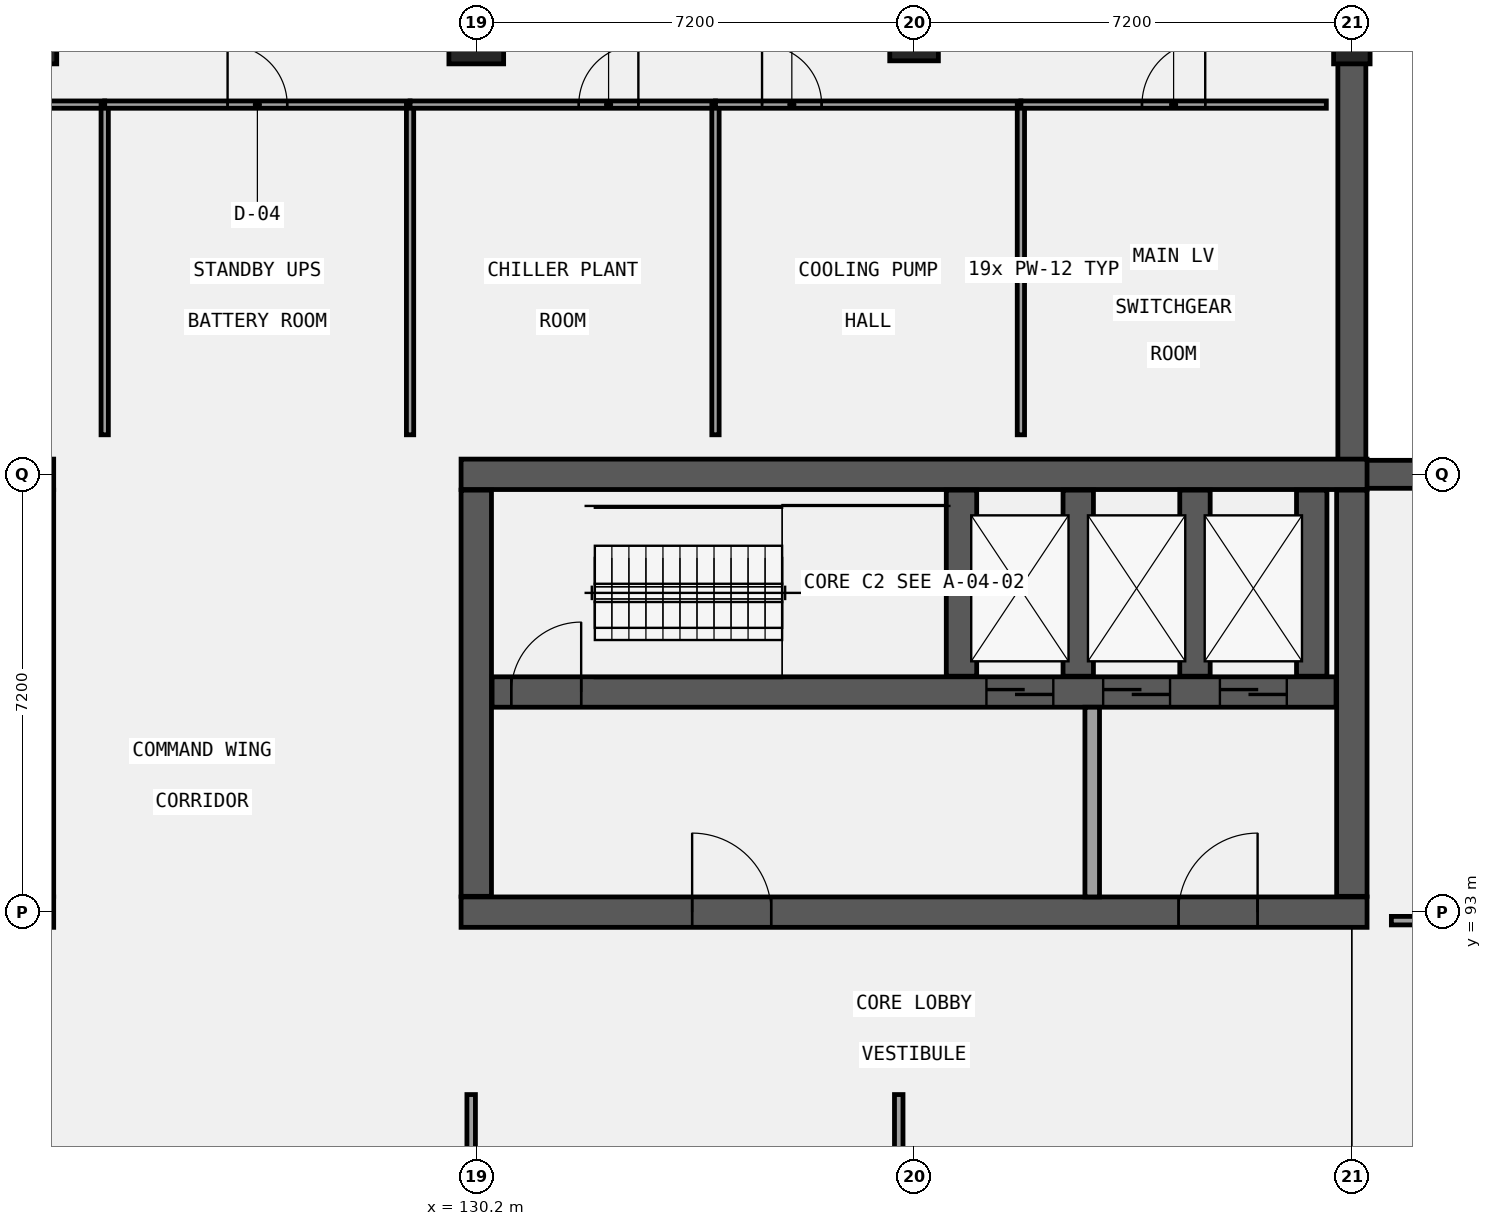
"""IFC4 building model, lengths in metres.
Left out: names, types, materials, properties, quantities, classifications, styles, units other than length and angle.
Written with IfcOpenShell. Run it as: python <this file> out.ifc"""

import sys

from ifc_helpers import new_model, si_unit, direction, frame, frame_2d, origin, origin_2d, place, context, subcontext, project, spatial, rectangle, extrude, element, fill, save


model = new_model("IFC4")
c1 = context("Model", 3, precision=1e-05, world=origin(), true_north=direction((0.0, 1.0)))
c2 = subcontext(c1, "Body", "Model", "MODEL_VIEW")
j1 = project(units=[si_unit("LENGTHUNIT", "METRE"), si_unit("PLANEANGLEUNIT", "RADIAN")], contexts=[c1])
p1 = place(None, origin())
s1 = spatial("IfcSite", under=j1, at=p1, CompositionType="ELEMENT")
p2 = place(p1, origin())
s2 = spatial("IfcBuilding", under=s1, at=p2, CompositionType="ELEMENT")
p3 = place(p2, frame((0.0, 0.0, -8.4)))
s3 = spatial("IfcBuildingStorey", under=s2, at=p3, CompositionType="ELEMENT", Elevation=-8.4)
p4 = place(p3, frame((144.6, 113.78, 0.0), z_axis=(0.0, 0.0, 1.0), x_axis=(0.0, -1.0, 0.0)))
e1 = element("IfcWall", 1, at=p4, inside=s3, PredefinedType="USERDEFINED", context=c2, shape_type="SweptSolid", body=[
    extrude(rectangle(XDim=13.35, YDim=0.46, at=frame_2d((6.675, 0.0))), origin(), (0.0, 0.0, 1.0), 3.25),
])
p5 = place(p3, frame((144.83, 100.2, 0.0), z_axis=(0.0, 0.0, 1.0), x_axis=(1.0, 0.0, 0.0)))
e2 = element("IfcWall", 2, at=p5, inside=s3, PredefinedType="USERDEFINED", context=c2, shape_type="SweptSolid", body=[
    extrude(rectangle(XDim=14.4, YDim=0.46, at=frame_2d((7.2, 0.0))), origin(), (0.0, 0.0, 1.0), 2.9),
])
p6 = place(p3, frame((108.35, 100.2, 0.0), z_axis=(0.0, 0.0, 1.0), x_axis=(1.0, 0.0, 0.0)))
e3 = element("IfcWall", 3, at=p6, inside=s3, PredefinedType="SHEAR", context=c2, shape_type="SweptSolid", body=[
    extrude(rectangle(XDim=14.9, YDim=0.5, at=frame_2d((7.45, 0.0))), origin(), (0.0, 0.0, 1.0), 4.2),
])
p7 = place(p3, frame((108.35, 93.0, 0.0), z_axis=(0.0, 0.0, 1.0), x_axis=(1.0, 0.0, 0.0)))
e4 = element("IfcWall", 4, at=p7, inside=s3, PredefinedType="SHEAR", context=c2, shape_type="SweptSolid", body=[
    extrude(rectangle(XDim=14.9, YDim=0.5, at=frame_2d((7.45, 0.0))), origin(), (0.0, 0.0, 1.0), 4.2),
])
p8 = place(p7, frame((3.8, 0.0, 0.0)))
e5 = element("IfcOpeningElement", 5, at=p8, cuts=e4, PredefinedType="OPENING", context=c2, shape_type="SweptSolid", body=[
    extrude(rectangle(XDim=1.3, YDim=2.2, at=frame_2d((0.65, 1.1))), frame((0.0, 0.26, 0.0), z_axis=(0.0, -1.0, 0.0), x_axis=(1.0, 0.0, 0.0)), (0.0, 0.0, 1.0), 0.52),
])
p9 = place(p7, frame((11.8, 0.0, 0.0)))
e6 = element("IfcOpeningElement", 6, at=p9, cuts=e4, PredefinedType="OPENING", context=c2, shape_type="SweptSolid", body=[
    extrude(rectangle(XDim=1.3, YDim=2.2, at=frame_2d((0.65, 1.1))), frame((0.0, 0.26, 0.0), z_axis=(0.0, -1.0, 0.0), x_axis=(1.0, 0.0, 0.0)), (0.0, 0.0, 1.0), 0.52),
])
p10 = place(p3, frame((123.0, 93.26, 0.0), z_axis=(0.0, 0.0, 1.0), x_axis=(0.0, 1.0, 0.0)))
e7 = element("IfcWall", 7, at=p10, inside=s3, PredefinedType="SHEAR", context=c2, shape_type="SweptSolid", body=[
    extrude(rectangle(XDim=6.68, YDim=0.5, at=frame_2d((3.34, 0.0))), origin(), (0.0, 0.0, 1.0), 4.2),
])
p11 = place(p3, frame((129.95, 100.2, 0.0), z_axis=(0.0, 0.0, 1.0), x_axis=(1.0, 0.0, 0.0)))
e8 = element("IfcWall", 8, at=p11, inside=s3, PredefinedType="SHEAR", context=c2, shape_type="SweptSolid", body=[
    extrude(rectangle(XDim=14.9, YDim=0.5, at=frame_2d((7.45, 0.0))), origin(), (0.0, 0.0, 1.0), 4.2),
])
p12 = place(p3, frame((129.95, 93.0, 0.0), z_axis=(0.0, 0.0, 1.0), x_axis=(1.0, 0.0, 0.0)))
e9 = element("IfcWall", 9, at=p12, inside=s3, PredefinedType="SHEAR", context=c2, shape_type="SweptSolid", body=[
    extrude(rectangle(XDim=14.9, YDim=0.5, at=frame_2d((7.45, 0.0))), origin(), (0.0, 0.0, 1.0), 4.2),
])
p13 = place(p12, frame((3.8, 0.0, 0.0)))
e10 = element("IfcOpeningElement", 10, at=p13, cuts=e9, PredefinedType="OPENING", context=c2, shape_type="SweptSolid", body=[
    extrude(rectangle(XDim=1.3, YDim=2.2, at=frame_2d((0.65, 1.1))), frame((0.0, 0.26, 0.0), z_axis=(0.0, -1.0, 0.0), x_axis=(1.0, 0.0, 0.0)), (0.0, 0.0, 1.0), 0.52),
])
p14 = place(p12, frame((11.8, 0.0, 0.0)))
e11 = element("IfcOpeningElement", 11, at=p14, cuts=e9, PredefinedType="OPENING", context=c2, shape_type="SweptSolid", body=[
    extrude(rectangle(XDim=1.3, YDim=2.2, at=frame_2d((0.65, 1.1))), frame((0.0, 0.26, 0.0), z_axis=(0.0, -1.0, 0.0), x_axis=(1.0, 0.0, 0.0)), (0.0, 0.0, 1.0), 0.52),
])
for number, where, z_axis, x_axis in (
    (12, (130.2, 93.26, 0.0), (0.0, 0.0, 1.0), (0.0, 1.0, 0.0)),
    (13, (144.6, 93.26, 0.0), (0.0, 0.0, 1.0), (0.0, 1.0, 0.0)),
):
    element("IfcWall", number, at=place(p3, frame(where, z_axis=z_axis, x_axis=x_axis)), inside=s3, PredefinedType="SHEAR", context=c2, shape_type="SweptSolid", body=[
        extrude(rectangle(XDim=6.68, YDim=0.5, at=frame_2d((3.34, 0.0))), origin(), (0.0, 0.0, 1.0), 4.2),
    ])
p15 = place(p3, frame((130.46, 96.62, 0.0), z_axis=(0.0, 0.0, 1.0), x_axis=(1.0, 0.0, 0.0)))
e14 = element("IfcWall", 14, at=p15, inside=s3, PredefinedType="SHEAR", context=c2, shape_type="SweptSolid", body=[
    extrude(rectangle(XDim=13.88, YDim=0.5, at=frame_2d((6.94, 0.0))), origin(), (0.0, 0.0, 1.0), 4.2),
])
p16 = place(p15, frame((8.13, 0.0, 0.0)))
e15 = element("IfcOpeningElement", 15, at=p16, cuts=e14, PredefinedType="OPENING", context=c2, shape_type="SweptSolid", body=[
    extrude(rectangle(XDim=1.1, YDim=2.15, at=frame_2d((0.55, 1.075))), frame((0.0, 0.26, 0.0), z_axis=(0.0, -1.0, 0.0), x_axis=(1.0, 0.0, 0.0)), (0.0, 0.0, 1.0), 0.52),
])
p17 = place(p15, frame((10.05, 0.0, 0.0)))
e16 = element("IfcOpeningElement", 16, at=p17, cuts=e14, PredefinedType="OPENING", context=c2, shape_type="SweptSolid", body=[
    extrude(rectangle(XDim=1.1, YDim=2.15, at=frame_2d((0.55, 1.075))), frame((0.0, 0.26, 0.0), z_axis=(0.0, -1.0, 0.0), x_axis=(1.0, 0.0, 0.0)), (0.0, 0.0, 1.0), 0.52),
])
p18 = place(p15, frame((11.97, 0.0, 0.0)))
e17 = element("IfcOpeningElement", 17, at=p18, cuts=e14, PredefinedType="OPENING", context=c2, shape_type="SweptSolid", body=[
    extrude(rectangle(XDim=1.1, YDim=2.15, at=frame_2d((0.55, 1.075))), frame((0.0, 0.26, 0.0), z_axis=(0.0, -1.0, 0.0), x_axis=(1.0, 0.0, 0.0)), (0.0, 0.0, 1.0), 0.52),
])
p19 = place(p15, frame((0.315, 0.0, 0.0)))
e18 = element("IfcOpeningElement", 18, at=p19, cuts=e14, PredefinedType="OPENING", context=c2, shape_type="SweptSolid", body=[
    extrude(rectangle(XDim=1.15, YDim=2.15, at=frame_2d((0.575, 1.075))), frame((0.0, 0.26, 0.0), z_axis=(0.0, -1.0, 0.0), x_axis=(1.0, 0.0, 0.0)), (0.0, 0.0, 1.0), 0.52),
])
for number, where, z_axis, x_axis in (
    (19, (138.18, 96.88, 0.0), (0.0, 0.0, 1.0), (0.0, 1.0, 0.0)),
    (20, (140.1, 96.88, 0.0), (0.0, 0.0, 1.0), (0.0, 1.0, 0.0)),
    (21, (142.02, 96.88, 0.0), (0.0, 0.0, 1.0), (0.0, 1.0, 0.0)),
    (22, (143.94, 96.88, 0.0), (0.0, 0.0, 1.0), (0.0, 1.0, 0.0)),
):
    element("IfcWall", number, at=place(p3, frame(where, z_axis=z_axis, x_axis=x_axis)), inside=s3, PredefinedType="SHEAR", context=c2, shape_type="SweptSolid", body=[
        extrude(rectangle(XDim=3.06, YDim=0.5, at=frame_2d((1.53, 0.0))), origin(), (0.0, 0.0, 1.0), 4.2),
    ])
p20 = place(p3, frame((123.0, 107.4, 0.0), z_axis=(0.0, 0.0, 1.0), x_axis=(1.0, 0.0, 0.0)))
e23 = element("IfcColumn", 23, at=p20, inside=s3, PredefinedType="COLUMN", context=c2, shape_type="SweptSolid", body=[
    extrude(rectangle(XDim=0.6, YDim=0.9, at=origin_2d()), origin(), (0.0, 0.0, 1.0), 4.2),
])
p21 = place(p3, frame((130.2, 107.4, 0.0), z_axis=(0.0, 0.0, 1.0), x_axis=(1.0, 0.0, 0.0)))
e24 = element("IfcColumn", 24, at=p21, inside=s3, PredefinedType="COLUMN", context=c2, shape_type="SweptSolid", body=[
    extrude(rectangle(XDim=0.9, YDim=0.9, at=origin_2d()), origin(), (0.0, 0.0, 1.0), 4.2),
])
p22 = place(p3, frame((137.4, 107.4, 0.0), z_axis=(0.0, 0.0, 1.0), x_axis=(1.0, 0.0, 0.0)))
e25 = element("IfcColumn", 25, at=p22, inside=s3, PredefinedType="COLUMN", context=c2, shape_type="SweptSolid", body=[
    extrude(rectangle(XDim=0.8, YDim=0.8, at=origin_2d()), origin(), (0.0, 0.0, 1.0), 4.2),
])
p23 = place(p3, frame((144.6, 107.4, 0.0), z_axis=(0.0, 0.0, 1.0), x_axis=(1.0, 0.0, 0.0)))
e26 = element("IfcColumn", 26, at=p23, inside=s3, PredefinedType="COLUMN", context=c2, shape_type="SweptSolid", body=[
    extrude(rectangle(XDim=0.6, YDim=0.9, at=origin_2d()), origin(), (0.0, 0.0, 1.0), 4.2),
])
p24 = place(p3, frame((140.33, 93.25, 0.0), z_axis=(0.0, 0.0, 1.0), x_axis=(0.0, 1.0, 0.0)))
e27 = element("IfcWall", 27, at=p24, inside=s3, PredefinedType="SOLIDWALL", context=c2, shape_type="SweptSolid", body=[
    extrude(rectangle(XDim=3.12, YDim=0.24, at=frame_2d((1.56, 0.0))), origin(), (0.0, 0.0, 1.0), 3.87),
])
p25 = place(p3, frame((119.066, 106.28, 0.0), z_axis=(0.0, 0.0, 1.0), x_axis=(1.0, 0.0, 0.0)))
e28 = element("IfcWall", 28, at=p25, inside=s3, PredefinedType="PARTITIONING", context=c2, shape_type="SweptSolid", body=[
    extrude(rectangle(XDim=5.023, YDim=0.12, at=frame_2d((2.512, 0.0))), origin(), (0.0, 0.0, 1.0), 3.9),
])
p26 = place(p25, frame((1.298, 0.0, 0.0)))
e29 = element("IfcOpeningElement", 29, at=p26, cuts=e28, PredefinedType="OPENING", context=c2, shape_type="SweptSolid", body=[
    extrude(rectangle(XDim=0.92, YDim=2.35, at=frame_2d((0.46, 1.175))), frame((0.0, 0.07, 0.0), z_axis=(0.0, -1.0, 0.0), x_axis=(1.0, 0.0, 0.0)), (0.0, 0.0, 1.0), 0.14),
])
p27 = place(p3, frame((124.089, 100.85, 0.0), z_axis=(0.0, 0.0, 1.0), x_axis=(0.0, 1.0, 0.0)))
e30 = element("IfcWall", 30, at=p27, inside=s3, PredefinedType="PARTITIONING", context=c2, shape_type="SweptSolid", body=[
    extrude(rectangle(XDim=5.43, YDim=0.12, at=frame_2d((2.715, 0.0))), origin(), (0.0, 0.0, 1.0), 3.9),
])
p28 = place(p3, frame((124.089, 106.28, 0.0), z_axis=(0.0, 0.0, 1.0), x_axis=(1.0, 0.0, 0.0)))
e31 = element("IfcWall", 31, at=p28, inside=s3, PredefinedType="PARTITIONING", context=c2, shape_type="SweptSolid", body=[
    extrude(rectangle(XDim=5.022, YDim=0.12, at=frame_2d((2.511, 0.0))), origin(), (0.0, 0.0, 1.0), 3.9),
])
p29 = place(p28, frame((2.021, 0.0, 0.0)))
e32 = element("IfcOpeningElement", 32, at=p29, cuts=e31, PredefinedType="OPENING", context=c2, shape_type="SweptSolid", body=[
    extrude(rectangle(XDim=0.98, YDim=2.1, at=frame_2d((0.49, 1.05))), frame((0.0, 0.07, 0.0), z_axis=(0.0, -1.0, 0.0), x_axis=(1.0, 0.0, 0.0)), (0.0, 0.0, 1.0), 0.14),
])
p30 = place(p3, frame((129.111, 100.85, 0.0), z_axis=(0.0, 0.0, 1.0), x_axis=(0.0, 1.0, 0.0)))
e33 = element("IfcWall", 33, at=p30, inside=s3, PredefinedType="PARTITIONING", context=c2, shape_type="SweptSolid", body=[
    extrude(rectangle(XDim=5.43, YDim=0.12, at=frame_2d((2.715, 0.0))), origin(), (0.0, 0.0, 1.0), 3.9),
])
p31 = place(p3, frame((129.111, 106.28, 0.0), z_axis=(0.0, 0.0, 1.0), x_axis=(1.0, 0.0, 0.0)))
e34 = element("IfcWall", 34, at=p31, inside=s3, PredefinedType="PARTITIONING", context=c2, shape_type="SweptSolid", body=[
    extrude(rectangle(XDim=5.023, YDim=0.12, at=frame_2d((2.511, 0.0))), origin(), (0.0, 0.0, 1.0), 3.9),
])
p32 = place(p31, frame((2.775, 0.0, 0.0)))
e35 = element("IfcOpeningElement", 35, at=p32, cuts=e34, PredefinedType="OPENING", context=c2, shape_type="SweptSolid", body=[
    extrude(rectangle(XDim=0.98, YDim=2.22, at=frame_2d((0.49, 1.11))), frame((0.0, 0.07, 0.0), z_axis=(0.0, -1.0, 0.0), x_axis=(1.0, 0.0, 0.0)), (0.0, 0.0, 1.0), 0.14),
])
p33 = place(p3, frame((134.134, 100.85, 0.0), z_axis=(0.0, 0.0, 1.0), x_axis=(0.0, 1.0, 0.0)))
e36 = element("IfcWall", 36, at=p33, inside=s3, PredefinedType="PARTITIONING", context=c2, shape_type="SweptSolid", body=[
    extrude(rectangle(XDim=5.43, YDim=0.12, at=frame_2d((2.715, 0.0))), origin(), (0.0, 0.0, 1.0), 3.9),
])
p34 = place(p3, frame((134.134, 106.28, 0.0), z_axis=(0.0, 0.0, 1.0), x_axis=(1.0, 0.0, 0.0)))
e37 = element("IfcWall", 37, at=p34, inside=s3, PredefinedType="PARTITIONING", context=c2, shape_type="SweptSolid", body=[
    extrude(rectangle(XDim=5.023, YDim=0.12, at=frame_2d((2.511, 0.0))), origin(), (0.0, 0.0, 1.0), 3.9),
])
p35 = place(p34, frame((0.766, 0.0, 0.0)))
e38 = element("IfcOpeningElement", 38, at=p35, cuts=e37, PredefinedType="OPENING", context=c2, shape_type="SweptSolid", body=[
    extrude(rectangle(XDim=0.98, YDim=2.35, at=frame_2d((0.49, 1.175))), frame((0.0, 0.07, 0.0), z_axis=(0.0, -1.0, 0.0), x_axis=(1.0, 0.0, 0.0)), (0.0, 0.0, 1.0), 0.14),
])
p36 = place(p3, frame((139.157, 100.85, 0.0), z_axis=(0.0, 0.0, 1.0), x_axis=(0.0, 1.0, 0.0)))
e39 = element("IfcWall", 39, at=p36, inside=s3, PredefinedType="PARTITIONING", context=c2, shape_type="SweptSolid", body=[
    extrude(rectangle(XDim=5.43, YDim=0.12, at=frame_2d((2.715, 0.0))), origin(), (0.0, 0.0, 1.0), 3.9),
])
p37 = place(p3, frame((139.157, 106.28, 0.0), z_axis=(0.0, 0.0, 1.0), x_axis=(1.0, 0.0, 0.0)))
e40 = element("IfcWall", 40, at=p37, inside=s3, PredefinedType="PARTITIONING", context=c2, shape_type="SweptSolid", body=[
    extrude(rectangle(XDim=5.023, YDim=0.12, at=frame_2d((2.511, 0.0))), origin(), (0.0, 0.0, 1.0), 3.9),
])
p38 = place(p37, frame((1.991, 0.0, 0.0)))
e41 = element("IfcOpeningElement", 41, at=p38, cuts=e40, PredefinedType="OPENING", context=c2, shape_type="SweptSolid", body=[
    extrude(rectangle(XDim=1.04, YDim=2.1, at=frame_2d((0.52, 1.05))), frame((0.0, 0.07, 0.0), z_axis=(0.0, -1.0, 0.0), x_axis=(1.0, 0.0, 0.0)), (0.0, 0.0, 1.0), 0.14),
])
p39 = place(p3, frame((130.116, 83.22, 0.0), z_axis=(0.0, 0.0, 1.0), x_axis=(0.0, 1.0, 0.0)))
e42 = element("IfcWall", 42, at=p39, inside=s3, PredefinedType="PARTITIONING", context=c2, shape_type="SweptSolid", body=[
    extrude(rectangle(XDim=6.78, YDim=0.14, at=frame_2d((3.39, 0.0))), origin(), (0.0, 0.0, 1.0), 3.05),
])
p40 = place(p3, frame((137.148, 83.22, 0.0), z_axis=(0.0, 0.0, 1.0), x_axis=(0.0, 1.0, 0.0)))
e43 = element("IfcWall", 43, at=p40, inside=s3, PredefinedType="PARTITIONING", context=c2, shape_type="SweptSolid", body=[
    extrude(rectangle(XDim=6.78, YDim=0.14, at=frame_2d((3.39, 0.0))), origin(), (0.0, 0.0, 1.0), 3.0),
])
p41 = place(p3, frame((145.25, 92.86, 0.0), z_axis=(0.0, 0.0, 1.0), x_axis=(1.0, 0.0, 0.0)))
e44 = element("IfcWall", 44, at=p41, inside=s3, PredefinedType="PARTITIONING", context=c2, shape_type="SweptSolid", body=[
    extrude(rectangle(XDim=6.03, YDim=0.14, at=frame_2d((3.015, 0.0))), origin(), (0.0, 0.0, 1.0), 3.05),
])
p42 = place(p16, frame((1.1, 0.0, 0.0), z_axis=(0.0, 0.0, 1.0), x_axis=(-1.0, 0.0, 0.0)))
e45 = element("IfcDoor", 45, at=p42, inside=s3, OperationType="DOUBLE_DOOR_SLIDING", PredefinedType="DOOR", context=c2, shape_type="SweptSolid", body=[
    extrude(rectangle(XDim=1.1, YDim=2.15, at=frame_2d((0.55, 1.075))), frame((0.0, 0.025, 0.0), z_axis=(0.0, -1.0, 0.0), x_axis=(1.0, 0.0, 0.0)), (0.0, 0.0, 1.0), 0.05),
])
fill(e15, e45)
p43 = place(p17, frame((1.1, 0.0, 0.0), z_axis=(0.0, 0.0, 1.0), x_axis=(-1.0, 0.0, 0.0)))
e46 = element("IfcDoor", 46, at=p43, inside=s3, OperationType="DOUBLE_DOOR_SLIDING", PredefinedType="DOOR", context=c2, shape_type="SweptSolid", body=[
    extrude(rectangle(XDim=1.1, YDim=2.15, at=frame_2d((0.55, 1.075))), frame((0.0, 0.025, 0.0), z_axis=(0.0, -1.0, 0.0), x_axis=(1.0, 0.0, 0.0)), (0.0, 0.0, 1.0), 0.05),
])
fill(e16, e46)
p44 = place(p18, frame((1.1, 0.0, 0.0), z_axis=(0.0, 0.0, 1.0), x_axis=(-1.0, 0.0, 0.0)))
e47 = element("IfcDoor", 47, at=p44, inside=s3, OperationType="DOUBLE_DOOR_SLIDING", PredefinedType="DOOR", context=c2, shape_type="SweptSolid", body=[
    extrude(rectangle(XDim=1.1, YDim=2.15, at=frame_2d((0.55, 1.075))), frame((0.0, 0.025, 0.0), z_axis=(0.0, -1.0, 0.0), x_axis=(1.0, 0.0, 0.0)), (0.0, 0.0, 1.0), 0.05),
])
fill(e17, e47)
p45 = place(p19, origin())
e48 = element("IfcDoor", 48, at=p45, inside=s3, OperationType="SINGLE_SWING_RIGHT", PredefinedType="DOOR", context=c2, shape_type="SweptSolid", body=[
    extrude(rectangle(XDim=1.15, YDim=2.15, at=frame_2d((0.575, 1.075))), frame((0.0, 0.025, 0.0), z_axis=(0.0, -1.0, 0.0), x_axis=(1.0, 0.0, 0.0)), (0.0, 0.0, 1.0), 0.05),
])
fill(e18, e48)
p46 = place(p13, frame((1.3, 0.0, 0.0), z_axis=(0.0, 0.0, 1.0), x_axis=(-1.0, 0.0, 0.0)))
e49 = element("IfcDoor", 49, at=p46, inside=s3, OperationType="SINGLE_SWING_LEFT", PredefinedType="DOOR", context=c2, shape_type="SweptSolid", body=[
    extrude(rectangle(XDim=1.3, YDim=2.2, at=frame_2d((0.65, 1.1))), frame((0.0, 0.025, 0.0), z_axis=(0.0, -1.0, 0.0), x_axis=(1.0, 0.0, 0.0)), (0.0, 0.0, 1.0), 0.05),
])
fill(e10, e49)
p47 = place(p14, frame((1.3, 0.0, 0.0), z_axis=(0.0, 0.0, 1.0), x_axis=(-1.0, 0.0, 0.0)))
e50 = element("IfcDoor", 50, at=p47, inside=s3, OperationType="SINGLE_SWING_RIGHT", PredefinedType="DOOR", context=c2, shape_type="SweptSolid", body=[
    extrude(rectangle(XDim=1.3, YDim=2.2, at=frame_2d((0.65, 1.1))), frame((0.0, 0.025, 0.0), z_axis=(0.0, -1.0, 0.0), x_axis=(1.0, 0.0, 0.0)), (0.0, 0.0, 1.0), 0.05),
])
fill(e11, e50)
p48 = place(p29, frame((0.98, 0.0, 0.0), z_axis=(0.0, 0.0, 1.0), x_axis=(-1.0, 0.0, 0.0)))
e51 = element("IfcDoor", 51, at=p48, inside=s3, OperationType="SINGLE_SWING_LEFT", PredefinedType="DOOR", context=c2, shape_type="SweptSolid", body=[
    extrude(rectangle(XDim=0.98, YDim=2.1, at=frame_2d((0.49, 1.05))), frame((0.0, 0.025, 0.0), z_axis=(0.0, -1.0, 0.0), x_axis=(1.0, 0.0, 0.0)), (0.0, 0.0, 1.0), 0.05),
])
fill(e32, e51)
p49 = place(p32, frame((0.98, 0.0, 0.0), z_axis=(0.0, 0.0, 1.0), x_axis=(-1.0, 0.0, 0.0)))
e52 = element("IfcDoor", 52, at=p49, inside=s3, OperationType="SINGLE_SWING_RIGHT", PredefinedType="DOOR", context=c2, shape_type="SweptSolid", body=[
    extrude(rectangle(XDim=0.98, YDim=2.22, at=frame_2d((0.49, 1.11))), frame((0.0, 0.025, 0.0), z_axis=(0.0, -1.0, 0.0), x_axis=(1.0, 0.0, 0.0)), (0.0, 0.0, 1.0), 0.05),
])
fill(e35, e52)
p50 = place(p35, frame((0.98, 0.0, 0.0), z_axis=(0.0, 0.0, 1.0), x_axis=(-1.0, 0.0, 0.0)))
e53 = element("IfcDoor", 53, at=p50, inside=s3, OperationType="SINGLE_SWING_LEFT", PredefinedType="DOOR", context=c2, shape_type="SweptSolid", body=[
    extrude(rectangle(XDim=0.98, YDim=2.35, at=frame_2d((0.49, 1.175))), frame((0.0, 0.025, 0.0), z_axis=(0.0, -1.0, 0.0), x_axis=(1.0, 0.0, 0.0)), (0.0, 0.0, 1.0), 0.05),
])
fill(e38, e53)
p51 = place(p38, frame((1.04, 0.0, 0.0), z_axis=(0.0, 0.0, 1.0), x_axis=(-1.0, 0.0, 0.0)))
e54 = element("IfcDoor", 54, at=p51, inside=s3, OperationType="SINGLE_SWING_RIGHT", PredefinedType="DOOR", context=c2, shape_type="SweptSolid", body=[
    extrude(rectangle(XDim=1.04, YDim=2.1, at=frame_2d((0.52, 1.05))), frame((0.0, 0.025, 0.0), z_axis=(0.0, -1.0, 0.0), x_axis=(1.0, 0.0, 0.0)), (0.0, 0.0, 1.0), 0.05),
])
fill(e41, e54)
save(model, sys.argv[1])
